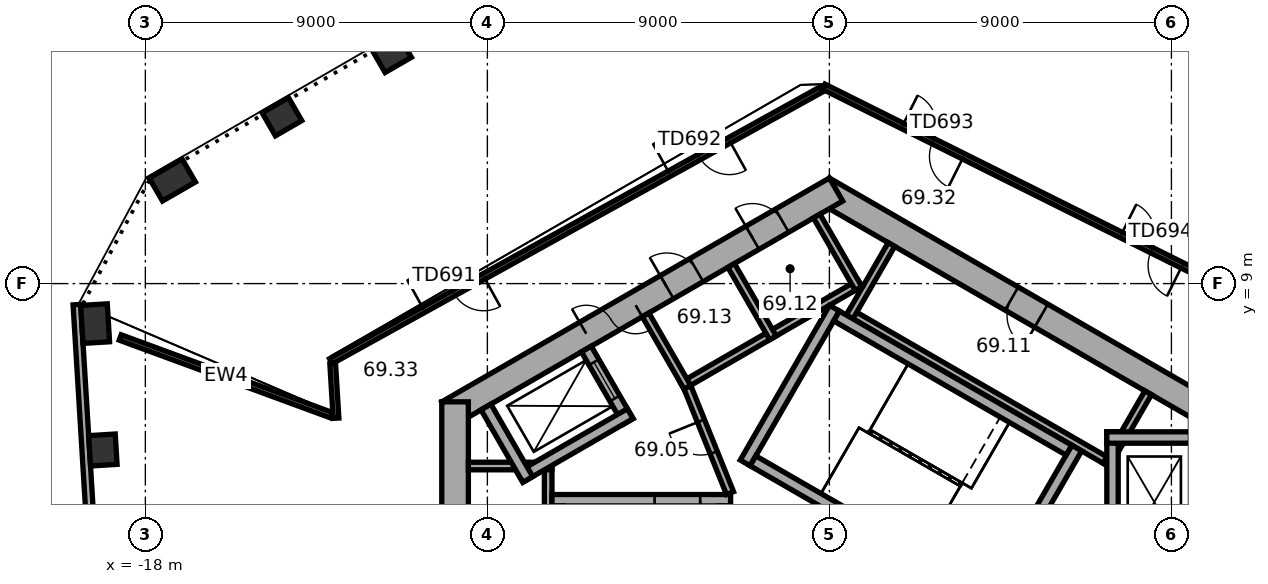
"""IFC4 building model, lengths in metres.
Left out: names, types, materials, properties, quantities, classifications, styles, units other than length and angle.
Written with IfcOpenShell. Run it as: python <this file> out.ifc"""

import sys

from ifc_helpers import new_model, si_unit, direction, frame, frame_2d, origin, origin_2d, place, context, subcontext, project, spatial, rectangle, extrude, element, fill, save


model = new_model("IFC4")
c1 = context("Model", 3, precision=1e-05, world=origin(), true_north=direction((0.0, 1.0)))
c2 = subcontext(c1, "Body", "Model", "MODEL_VIEW")
j1 = project(units=[si_unit("LENGTHUNIT", "METRE"), si_unit("PLANEANGLEUNIT", "RADIAN")], contexts=[c1])
p1 = place(None, origin())
s1 = spatial("IfcSite", under=j1, at=p1, CompositionType="ELEMENT")
p2 = place(p1, origin())
s2 = spatial("IfcBuilding", under=s1, at=p2, CompositionType="ELEMENT")
p3 = place(p2, frame((0.0, 0.0, 278.3)))
s3 = spatial("IfcBuildingStorey", under=s2, at=p3, CompositionType="ELEMENT", Elevation=278.3)
for number, where, z_axis, x_axis in (
    (1, (-11.52, 15.057, 0.0), (0.0, 0.0, 1.0), (-0.866, -0.5, 0.0)),
    (2, (-14.406, 13.391, 0.0), (0.0, 0.0, 1.0), (-0.866, -0.5, 0.0)),
):
    element("IfcColumn", number, at=place(p3, frame(where, z_axis=z_axis, x_axis=x_axis)), inside=s3, PredefinedType="COLUMN", context=c2, shape_type="SweptSolid", body=[
        extrude(rectangle(XDim=0.8, YDim=0.7, at=origin_2d()), origin(), (0.0, 0.0, 1.0), 7.4),
    ])
for number, where, z_axis, x_axis in (
    (3, (-17.291, 11.726, 0.0), (0.0, 0.0, 1.0), (-0.866, -0.5, 0.0)),
    (4, (-19.321, 7.947, 0.0), (0.0, 0.0, 1.0), (0.061, -0.998, 0.0)),
):
    element("IfcColumn", number, at=place(p3, frame(where, z_axis=z_axis, x_axis=x_axis)), inside=s3, PredefinedType="COLUMN", context=c2, shape_type="SweptSolid", body=[
        extrude(rectangle(XDim=1.0, YDim=0.7, at=origin_2d()), origin(), (0.0, 0.0, 1.0), 7.4),
    ])
p4 = place(p3, frame((-19.118, 4.621, 0.0), z_axis=(0.0, 0.0, 1.0), x_axis=(0.061048539535, -0.998134798422, 0.0)))
e5 = element("IfcColumn", 5, at=p4, inside=s3, PredefinedType="COLUMN", context=c2, shape_type="SweptSolid", body=[
    extrude(rectangle(XDim=0.8, YDim=0.7, at=origin_2d()), origin(), (0.0, 0.0, 1.0), 7.4),
])
p5 = place(p3, frame((10.025, 5.586, 0.0), z_axis=(0.0, 0.0, 1.0), x_axis=(-0.866026453023, 0.499998182661, 0.0)))
e6 = element("IfcWall", 6, at=p5, inside=s3, PredefinedType="SHEAR", context=c2, shape_type="SweptSolid", body=[
    extrude(rectangle(XDim=11.778, YDim=0.7, at=frame_2d((5.889, 0.0))), origin(), (0.0, 0.0, 1.0), 7.4),
])
p6 = place(p5, frame((5.139, 0.0, 0.0)))
e7 = element("IfcOpeningElement", 7, at=p6, cuts=e6, PredefinedType="OPENING", context=c2, shape_type="SweptSolid", body=[
    extrude(rectangle(XDim=0.9, YDim=2.1, at=frame_2d((0.45, 1.05))), frame((0.0, 0.36, 0.0), z_axis=(0.0, -1.0, 0.0), x_axis=(1.0, 0.0, 0.0)), (0.0, 0.0, 1.0), 0.72),
])
p7 = place(p3, frame((0.175, 11.475, 0.0), z_axis=(0.0, 0.0, 1.0), x_axis=(-0.866026453023, -0.499998182661, 0.0)))
e8 = element("IfcWall", 8, at=p7, inside=s3, PredefinedType="SHEAR", context=c2, shape_type="SweptSolid", body=[
    extrude(rectangle(XDim=11.778, YDim=0.7, at=frame_2d((5.889, 0.0))), origin(), (0.0, 0.0, 1.0), 7.4),
])
p8 = place(p7, frame((6.089, 0.0, 0.0)))
e9 = element("IfcOpeningElement", 9, at=p8, cuts=e8, PredefinedType="OPENING", context=c2, shape_type="SweptSolid", body=[
    extrude(rectangle(XDim=1.5, YDim=2.1, at=frame_2d((0.75, 1.05))), frame((0.0, 0.36, 0.0), z_axis=(0.0, -1.0, 0.0), x_axis=(1.0, 0.0, 0.0)), (0.0, 0.0, 1.0), 0.72),
])
p9 = place(p7, frame((1.639, 0.0, 0.0)))
e10 = element("IfcOpeningElement", 10, at=p9, cuts=e8, PredefinedType="OPENING", context=c2, shape_type="SweptSolid", body=[
    extrude(rectangle(XDim=0.9, YDim=2.1, at=frame_2d((0.45, 1.05))), frame((0.0, 0.36, 0.0), z_axis=(0.0, -1.0, 0.0), x_axis=(1.0, 0.0, 0.0)), (0.0, 0.0, 1.0), 0.72),
])
p10 = place(p7, frame((4.239, 0.0, 0.0)))
e11 = element("IfcOpeningElement", 11, at=p10, cuts=e8, PredefinedType="OPENING", context=c2, shape_type="SweptSolid", body=[
    extrude(rectangle(XDim=0.9, YDim=2.1, at=frame_2d((0.45, 1.05))), frame((0.0, 0.36, 0.0), z_axis=(0.0, -1.0, 0.0), x_axis=(1.0, 0.0, 0.0)), (0.0, 0.0, 1.0), 0.72),
])
p11 = place(p3, frame((-9.85, 5.889, 0.0), z_axis=(0.0, 0.0, 1.0), x_axis=(0.0, -1.0, 0.0)))
e12 = element("IfcWall", 12, at=p11, inside=s3, PredefinedType="SHEAR", context=c2, shape_type="SweptSolid", body=[
    extrude(rectangle(XDim=11.778, YDim=0.7, at=frame_2d((5.889, 0.0))), origin(), (0.0, 0.0, 1.0), 7.4),
])
p12 = place(p11, frame((5.039, 0.0, 0.0)))
e13 = element("IfcOpeningElement", 13, at=p12, cuts=e12, PredefinedType="OPENING", context=c2, shape_type="SweptSolid", body=[
    extrude(rectangle(XDim=1.1, YDim=2.1, at=frame_2d((0.55, 1.05))), frame((0.0, 0.36, 0.0), z_axis=(0.0, -1.0, 0.0), x_axis=(1.0, 0.0, 0.0)), (0.0, 0.0, 1.0), 0.72),
])
p13 = place(p11, frame((7.639, 0.0, 0.0)))
e14 = element("IfcOpeningElement", 14, at=p13, cuts=e12, PredefinedType="OPENING", context=c2, shape_type="SweptSolid", body=[
    extrude(rectangle(XDim=1.1, YDim=2.1, at=frame_2d((0.55, 1.05))), frame((0.0, 0.36, 0.0), z_axis=(0.0, -1.0, 0.0), x_axis=(1.0, 0.0, 0.0)), (0.0, 0.0, 1.0), 0.72),
])
p14 = place(p3, frame((-19.802, 8.446, 0.0), z_axis=(0.0, 0.0, 1.0), x_axis=(0.061036964236, -0.99813550633, 0.0)))
e15 = element("IfcWall", 15, at=p14, inside=s3, PredefinedType="STANDARD", context=c2, shape_type="SweptSolid", body=[
    extrude(rectangle(XDim=17.723, YDim=0.2, at=frame_2d((8.862, 0.0))), origin(), (0.0, 0.0, 1.0), 7.4),
])
p15 = place(p3, frame((-18.662, 7.582, 0.0), z_axis=(0.0, 0.0, 1.0), x_axis=(0.938501865144, -0.345274165152, 0.0)))
e16 = element("IfcWall", 16, at=p15, inside=s3, PredefinedType="STANDARD", context=c2, shape_type="SweptSolid", body=[
    extrude(rectangle(XDim=5.93, YDim=0.15, at=frame_2d((2.965, 0.0))), origin(), (0.0, 0.0, 1.0), 2.6),
])
p16 = place(p3, frame((-12.982, 5.458, 0.0), z_axis=(0.0, 0.0, 1.0), x_axis=(-0.06115150754, 0.998128495298, 0.0)))
e17 = element("IfcWall", 17, at=p16, inside=s3, PredefinedType="STANDARD", context=c2, shape_type="SweptSolid", body=[
    extrude(rectangle(XDim=1.437, YDim=0.15, at=frame_2d((0.719, 0.0))), origin(), (0.0, 0.0, 1.0), 2.6),
])
p17 = place(p3, frame((-13.117, 6.958, 0.0), z_axis=(0.0, 0.0, 1.0), x_axis=(0.874660896688, 0.484735304889, 0.0)))
e18 = element("IfcWall", 18, at=p17, inside=s3, PredefinedType="STANDARD", context=c2, shape_type="SweptSolid", body=[
    extrude(rectangle(XDim=14.781, YDim=0.15, at=frame_2d((7.39, 0.0))), origin(), (0.0, 0.0, 1.0), 2.6),
])
p18 = place(p17, frame((2.795, 0.0, 0.0)))
e19 = element("IfcOpeningElement", 19, at=p18, cuts=e18, PredefinedType="OPENING", context=c2, shape_type="SweptSolid", body=[
    extrude(rectangle(XDim=1.8, YDim=2.4, at=frame_2d((0.9, 1.2))), frame((0.0, 0.085, 0.0), z_axis=(0.0, -1.0, 0.0), x_axis=(1.0, 0.0, 0.0)), (0.0, 0.0, 1.0), 0.17),
])
p19 = place(p17, frame((10.186, 0.0, 0.0)))
e20 = element("IfcOpeningElement", 20, at=p19, cuts=e18, PredefinedType="OPENING", context=c2, shape_type="SweptSolid", body=[
    extrude(rectangle(XDim=1.8, YDim=2.4, at=frame_2d((0.9, 1.2))), frame((0.0, 0.085, 0.0), z_axis=(0.0, -1.0, 0.0), x_axis=(1.0, 0.0, 0.0)), (0.0, 0.0, 1.0), 0.17),
])
p20 = place(p3, frame((-0.149, 14.181, 0.0), z_axis=(0.0, 0.0, 1.0), x_axis=(0.894939310063, -0.446187887894, 0.0)))
e21 = element("IfcWall", 21, at=p20, inside=s3, PredefinedType="STANDARD", context=c2, shape_type="SweptSolid", body=[
    extrude(rectangle(XDim=12.857, YDim=0.15, at=frame_2d((6.428, 0.0))), origin(), (0.0, 0.0, 1.0), 2.6),
])
p21 = place(p20, frame((2.314, 0.0, 0.0)))
e22 = element("IfcOpeningElement", 22, at=p21, cuts=e21, PredefinedType="OPENING", context=c2, shape_type="SweptSolid", body=[
    extrude(rectangle(XDim=1.8, YDim=2.4, at=frame_2d((0.9, 1.2))), frame((0.0, 0.085, 0.0), z_axis=(0.0, -1.0, 0.0), x_axis=(1.0, 0.0, 0.0)), (0.0, 0.0, 1.0), 0.17),
])
p22 = place(p20, frame((8.743, 0.0, 0.0)))
e23 = element("IfcOpeningElement", 23, at=p22, cuts=e21, PredefinedType="OPENING", context=c2, shape_type="SweptSolid", body=[
    extrude(rectangle(XDim=1.8, YDim=2.4, at=frame_2d((0.9, 1.2))), frame((0.0, 0.085, 0.0), z_axis=(0.0, -1.0, 0.0), x_axis=(1.0, 0.0, 0.0)), (0.0, 0.0, 1.0), 0.17),
])
p23 = place(p3, frame((7.424, 4.259, 0.0), z_axis=(0.0, 0.0, 1.0), x_axis=(-0.866026010844, 0.49999894854, 0.0)))
e24 = element("IfcWall", 24, at=p23, inside=s3, PredefinedType="PARTITIONING", context=c2, shape_type="SweptSolid", body=[
    extrude(rectangle(XDim=8.0, YDim=0.2, at=frame_2d((4.0, 0.0))), origin(), (0.0, 0.0, 1.0), 7.12),
])
for number, where, z_axis, x_axis in (
    (25, (7.287, 4.222, 0.0), (0.0, 0.0, 1.0), (0.5, 0.866, 0.0)),
    (26, (0.532, 8.122, 0.0), (0.0, 0.0, 1.0), (0.5, 0.866, 0.0)),
):
    element("IfcWall", number, at=place(p3, frame(where, z_axis=z_axis, x_axis=x_axis)), inside=s3, PredefinedType="PARTITIONING", context=c2, shape_type="SweptSolid", body=[
        extrude(rectangle(XDim=2.2, YDim=0.2, at=frame_2d((1.1, 0.0))), origin(), (0.0, 0.0, 1.0), 7.12),
    ])
p24 = place(p3, frame((0.803, 9.009, 0.0), z_axis=(0.0, 0.0, 1.0), x_axis=(-0.866028230842, -0.499995103361, 0.0)))
e27 = element("IfcWall", 27, at=p24, inside=s3, PredefinedType="PARTITIONING", context=c2, shape_type="SweptSolid", body=[
    extrude(rectangle(XDim=5.4, YDim=0.2, at=frame_2d((2.7, 0.0))), origin(), (0.0, 0.0, 1.0), 7.12),
])
p25 = place(p3, frame((0.767, 8.872, 0.0), z_axis=(0.0, 0.0, 1.0), x_axis=(-0.499994660107, 0.866028486751, 0.0)))
e28 = element("IfcWall", 28, at=p25, inside=s3, PredefinedType="PARTITIONING", context=c2, shape_type="SweptSolid", body=[
    extrude(rectangle(XDim=2.2, YDim=0.2, at=frame_2d((1.1, 0.0))), origin(), (0.0, 0.0, 1.0), 7.12),
])
for number, where, z_axis, x_axis in (
    (29, (-1.485, 7.572, 0.0), (0.0, 0.0, 1.0), (-0.5, 0.866, 0.0)),
    (30, (-3.737, 6.272, 0.0), (0.0, 0.0, 1.0), (-0.5, 0.866, 0.0)),
):
    element("IfcWall", number, at=place(p3, frame(where, z_axis=z_axis, x_axis=x_axis)), inside=s3, PredefinedType="PARTITIONING", context=c2, shape_type="SweptSolid", body=[
        extrude(rectangle(XDim=2.2, YDim=0.2, at=frame_2d((1.1, 0.0))), origin(), (0.0, 0.0, 1.0), 7.12),
    ])
p26 = place(p3, frame((-7.4, 4.3, 0.0), z_axis=(0.0, 0.0, 1.0), x_axis=(0.0, -1.0, 0.0)))
e31 = element("IfcWall", 31, at=p26, inside=s3, PredefinedType="PARTITIONING", context=c2, shape_type="SweptSolid", body=[
    extrude(rectangle(XDim=8.0, YDim=0.2, at=frame_2d((4.0, 0.0))), origin(), (0.0, 0.0, 1.0), 7.12),
])
p27 = place(p3, frame((-7.3, 4.2, 0.0), z_axis=(0.0, 0.0, 1.0), x_axis=(-1.0, 0.0, 0.0)))
e32 = element("IfcWall", 32, at=p27, inside=s3, PredefinedType="PARTITIONING", context=c2, shape_type="SweptSolid", body=[
    extrude(rectangle(XDim=2.2, YDim=0.2, at=frame_2d((1.1, 0.0))), origin(), (0.0, 0.0, 1.0), 7.12),
])
p28 = place(p3, frame((4.158, 0.602, 0.0), z_axis=(0.0, 0.0, 1.0), x_axis=(0.499977259774, 0.866038532462, 0.0)))
e33 = element("IfcWall", 33, at=p28, inside=s3, PredefinedType="SHEAR", context=c2, shape_type="SweptSolid", body=[
    extrude(rectangle(XDim=4.7, YDim=0.3, at=frame_2d((2.35, 0.0))), origin(), (0.0, 0.0, 1.0), 7.12),
])
p29 = place(p28, frame((0.8, 0.0, 0.0)))
e34 = element("IfcOpeningElement", 34, at=p29, cuts=e33, PredefinedType="OPENING", context=c2, shape_type="SweptSolid", body=[
    extrude(rectangle(XDim=1.2, YDim=2.1, at=frame_2d((0.6, 1.05))), frame((0.0, 0.16, 0.0), z_axis=(0.0, -1.0, 0.0), x_axis=(1.0, 0.0, 0.0)), (0.0, 0.0, 1.0), 0.32),
])
p30 = place(p3, frame((-2.216, 4.282, 0.0), z_axis=(0.0, 0.0, 1.0), x_axis=(0.499977259774, 0.866038532462, 0.0)))
e35 = element("IfcWall", 35, at=p30, inside=s3, PredefinedType="SHEAR", context=c2, shape_type="SweptSolid", body=[
    extrude(rectangle(XDim=4.7, YDim=0.3, at=frame_2d((2.35, 0.0))), origin(), (0.0, 0.0, 1.0), 7.12),
])
for number, where, z_axis, x_axis in (
    (36, (4.103, 0.807, 0.0), (0.0, 0.0, 1.0), (-0.866, 0.5, 0.0)),
    (37, (6.303, 4.617, 0.0), (0.0, 0.0, 1.0), (-0.866, 0.5, 0.0)),
):
    element("IfcWall", number, at=place(p3, frame(where, z_axis=z_axis, x_axis=x_axis)), inside=s3, PredefinedType="SHEAR", context=c2, shape_type="SweptSolid", body=[
        extrude(rectangle(XDim=7.06, YDim=0.3, at=frame_2d((3.53, 0.0))), origin(), (0.0, 0.0, 1.0), 7.12),
    ])
p31 = place(p3, frame((-2.6, 3.3, 0.0), z_axis=(0.0, 0.0, 1.0), x_axis=(-1.0, 0.0, 0.0)))
e38 = element("IfcWall", 38, at=p31, inside=s3, PredefinedType="SHEAR", context=c2, shape_type="SweptSolid", body=[
    extrude(rectangle(XDim=4.7, YDim=0.3, at=frame_2d((2.35, 0.0))), origin(), (0.0, 0.0, 1.0), 7.12),
])
p32 = place(p31, frame((0.8, 0.0, 0.0)))
e39 = element("IfcOpeningElement", 39, at=p32, cuts=e38, PredefinedType="OPENING", context=c2, shape_type="SweptSolid", body=[
    extrude(rectangle(XDim=1.2, YDim=2.1, at=frame_2d((0.6, 1.05))), frame((0.0, 0.16, 0.0), z_axis=(0.0, -1.0, 0.0), x_axis=(1.0, 0.0, 0.0)), (0.0, 0.0, 1.0), 0.32),
])
p33 = place(p3, frame((7.45, 1.75, 0.0), z_axis=(0.0, 0.0, 1.0), x_axis=(0.0, 1.0, 0.0)))
e40 = element("IfcWall", 40, at=p33, inside=s3, PredefinedType="SHEAR", context=c2, shape_type="SweptSolid", body=[
    extrude(rectangle(XDim=3.35, YDim=0.3, at=frame_2d((1.675, 0.0))), origin(), (0.0, 0.0, 1.0), 7.12),
])
p34 = place(p3, frame((7.3, 4.95, 0.0), z_axis=(0.0, 0.0, 1.0), x_axis=(1.0, 0.0, 0.0)))
e41 = element("IfcWall", 41, at=p34, inside=s3, PredefinedType="SHEAR", context=c2, shape_type="SweptSolid", body=[
    extrude(rectangle(XDim=2.2, YDim=0.3, at=frame_2d((1.1, 0.0))), origin(), (0.0, 0.0, 1.0), 7.12),
])
p35 = place(p3, frame((-5.295, 5.372, 0.0), z_axis=(0.0, 0.0, 1.0), x_axis=(-0.500077893725, 0.86598042715, 0.0)))
e42 = element("IfcWall", 42, at=p35, inside=s3, PredefinedType="SHEAR", context=c2, shape_type="SweptSolid", body=[
    extrude(rectangle(XDim=2.2, YDim=0.3, at=frame_2d((1.1, 0.0))), origin(), (0.0, 0.0, 1.0), 7.12),
])
p36 = place(p35, frame((0.7, 0.0, 0.0)))
e43 = element("IfcOpeningElement", 43, at=p36, cuts=e42, PredefinedType="OPENING", context=c2, shape_type="SweptSolid", body=[
    extrude(rectangle(XDim=1.1, YDim=2.1, at=frame_2d((0.55, 1.05))), frame((0.0, 0.16, 0.0), z_axis=(0.0, -1.0, 0.0), x_axis=(1.0, 0.0, 0.0)), (0.0, 0.0, 1.0), 0.32),
])
p37 = place(p3, frame((-5.24, 5.577, 0.0), z_axis=(0.0, 0.0, 1.0), x_axis=(-0.866014461049, -0.500018952895, 0.0)))
e44 = element("IfcWall", 44, at=p37, inside=s3, PredefinedType="SHEAR", context=c2, shape_type="SweptSolid", body=[
    extrude(rectangle(XDim=3.35, YDim=0.3, at=frame_2d((1.675, 0.0))), origin(), (0.0, 0.0, 1.0), 7.12),
])
p38 = place(p3, frame((-7.937, 3.847, 0.0), z_axis=(0.0, 0.0, 1.0), x_axis=(-0.50002983664, 0.866008176907, 0.0)))
e45 = element("IfcWall", 45, at=p38, inside=s3, PredefinedType="SHEAR", context=c2, shape_type="SweptSolid", body=[
    extrude(rectangle(XDim=2.2, YDim=0.3, at=frame_2d((1.1, 0.0))), origin(), (0.0, 0.0, 1.0), 7.12),
])
p39 = place(p3, frame((-2.615, 3.487, 0.0), z_axis=(0.0, 0.0, 1.0), x_axis=(-0.373576831041, 0.92759924068, 0.0)))
e46 = element("IfcWall", 46, at=p39, inside=s3, PredefinedType="PARTITIONING", context=c2, shape_type="SweptSolid", body=[
    extrude(rectangle(XDim=3.002, YDim=0.2, at=frame_2d((1.501, 0.0))), origin(), (0.0, 0.0, 1.0), 7.12),
])
p40 = place(p39, frame((1.15, 0.0, 0.0)))
e47 = element("IfcOpeningElement", 47, at=p40, cuts=e46, PredefinedType="OPENING", context=c2, shape_type="SweptSolid", body=[
    extrude(rectangle(XDim=0.9, YDim=2.1, at=frame_2d((0.45, 1.05))), frame((0.0, 0.11, 0.0), z_axis=(0.0, -1.0, 0.0), x_axis=(1.0, 0.0, 0.0)), (0.0, 0.0, 1.0), 0.22),
])
p41 = place(p18, origin())
e48 = element("IfcDoor", 48, at=p41, inside=s3, OperationType="DOUBLE_DOOR_DOUBLE_SWING", PredefinedType="DOOR", context=c2, shape_type="SweptSolid", body=[
    extrude(rectangle(XDim=1.8, YDim=2.4, at=frame_2d((0.9, 1.2))), frame((0.0, 0.025, 0.0), z_axis=(0.0, -1.0, 0.0), x_axis=(1.0, 0.0, 0.0)), (0.0, 0.0, 1.0), 0.05),
])
fill(e19, e48)
p42 = place(p19, origin())
e49 = element("IfcDoor", 49, at=p42, inside=s3, OperationType="DOUBLE_DOOR_DOUBLE_SWING", PredefinedType="DOOR", context=c2, shape_type="SweptSolid", body=[
    extrude(rectangle(XDim=1.8, YDim=2.4, at=frame_2d((0.9, 1.2))), frame((0.0, 0.025, 0.0), z_axis=(0.0, -1.0, 0.0), x_axis=(1.0, 0.0, 0.0)), (0.0, 0.0, 1.0), 0.05),
])
fill(e20, e49)
p43 = place(p21, origin())
e50 = element("IfcDoor", 50, at=p43, inside=s3, OperationType="DOUBLE_DOOR_DOUBLE_SWING", PredefinedType="DOOR", context=c2, shape_type="SweptSolid", body=[
    extrude(rectangle(XDim=1.8, YDim=2.4, at=frame_2d((0.9, 1.2))), frame((0.0, 0.025, 0.0), z_axis=(0.0, -1.0, 0.0), x_axis=(1.0, 0.0, 0.0)), (0.0, 0.0, 1.0), 0.05),
])
fill(e22, e50)
p44 = place(p22, origin())
e51 = element("IfcDoor", 51, at=p44, inside=s3, OperationType="DOUBLE_DOOR_DOUBLE_SWING", PredefinedType="DOOR", context=c2, shape_type="SweptSolid", body=[
    extrude(rectangle(XDim=1.8, YDim=2.4, at=frame_2d((0.9, 1.2))), frame((0.0, 0.025, 0.0), z_axis=(0.0, -1.0, 0.0), x_axis=(1.0, 0.0, 0.0)), (0.0, 0.0, 1.0), 0.05),
])
fill(e23, e51)
p45 = place(p8, origin())
e52 = element("IfcDoor", 52, at=p45, inside=s3, OperationType="DOUBLE_DOOR_SINGLE_SWING", PredefinedType="DOOR", context=c2, shape_type="SweptSolid", body=[
    extrude(rectangle(XDim=1.5, YDim=2.1, at=frame_2d((0.75, 1.05))), frame((0.0, 0.025, 0.0), z_axis=(0.0, -1.0, 0.0), x_axis=(1.0, 0.0, 0.0)), (0.0, 0.0, 1.0), 0.05),
])
fill(e9, e52)
p46 = place(p32, origin())
e53 = element("IfcDoor", 53, at=p46, inside=s3, OperationType="SINGLE_SWING_RIGHT", PredefinedType="DOOR", context=c2, shape_type="SweptSolid", body=[
    extrude(rectangle(XDim=1.2, YDim=2.1, at=frame_2d((0.6, 1.05))), frame((0.0, 0.025, 0.0), z_axis=(0.0, -1.0, 0.0), x_axis=(1.0, 0.0, 0.0)), (0.0, 0.0, 1.0), 0.05),
])
fill(e39, e53)
p47 = place(p40, origin())
e54 = element("IfcDoor", 54, at=p47, inside=s3, OperationType="SINGLE_SWING_LEFT", PredefinedType="DOOR", context=c2, shape_type="SweptSolid", body=[
    extrude(rectangle(XDim=0.9, YDim=2.1, at=frame_2d((0.45, 1.05))), frame((0.0, 0.025, 0.0), z_axis=(0.0, -1.0, 0.0), x_axis=(1.0, 0.0, 0.0)), (0.0, 0.0, 1.0), 0.05),
])
fill(e47, e54)
p48 = place(p6, origin())
e55 = element("IfcDoor", 55, at=p48, inside=s3, OperationType="SINGLE_SWING_LEFT", PredefinedType="DOOR", context=c2, shape_type="SweptSolid", body=[
    extrude(rectangle(XDim=0.9, YDim=2.1, at=frame_2d((0.45, 1.05))), frame((0.0, 0.025, 0.0), z_axis=(0.0, -1.0, 0.0), x_axis=(1.0, 0.0, 0.0)), (0.0, 0.0, 1.0), 0.05),
])
fill(e7, e55)
p49 = place(p9, origin())
e56 = element("IfcDoor", 56, at=p49, inside=s3, OperationType="SINGLE_SWING_LEFT", PredefinedType="DOOR", context=c2, shape_type="SweptSolid", body=[
    extrude(rectangle(XDim=0.9, YDim=2.1, at=frame_2d((0.45, 1.05))), frame((0.0, 0.025, 0.0), z_axis=(0.0, -1.0, 0.0), x_axis=(1.0, 0.0, 0.0)), (0.0, 0.0, 1.0), 0.05),
])
fill(e10, e56)
p50 = place(p10, origin())
e57 = element("IfcDoor", 57, at=p50, inside=s3, OperationType="SINGLE_SWING_LEFT", PredefinedType="DOOR", context=c2, shape_type="SweptSolid", body=[
    extrude(rectangle(XDim=0.9, YDim=2.1, at=frame_2d((0.45, 1.05))), frame((0.0, 0.025, 0.0), z_axis=(0.0, -1.0, 0.0), x_axis=(1.0, 0.0, 0.0)), (0.0, 0.0, 1.0), 0.05),
])
fill(e11, e57)
p51 = place(p36, origin())
e58 = element("IfcDoor", 58, at=p51, inside=s3, OperationType="DOUBLE_DOOR_SLIDING", PredefinedType="DOOR", context=c2, shape_type="SweptSolid", body=[
    extrude(rectangle(XDim=1.1, YDim=2.1, at=frame_2d((0.55, 1.05))), frame((0.0, 0.025, 0.0), z_axis=(0.0, -1.0, 0.0), x_axis=(1.0, 0.0, 0.0)), (0.0, 0.0, 1.0), 0.05),
])
fill(e43, e58)
save(model, sys.argv[1])
